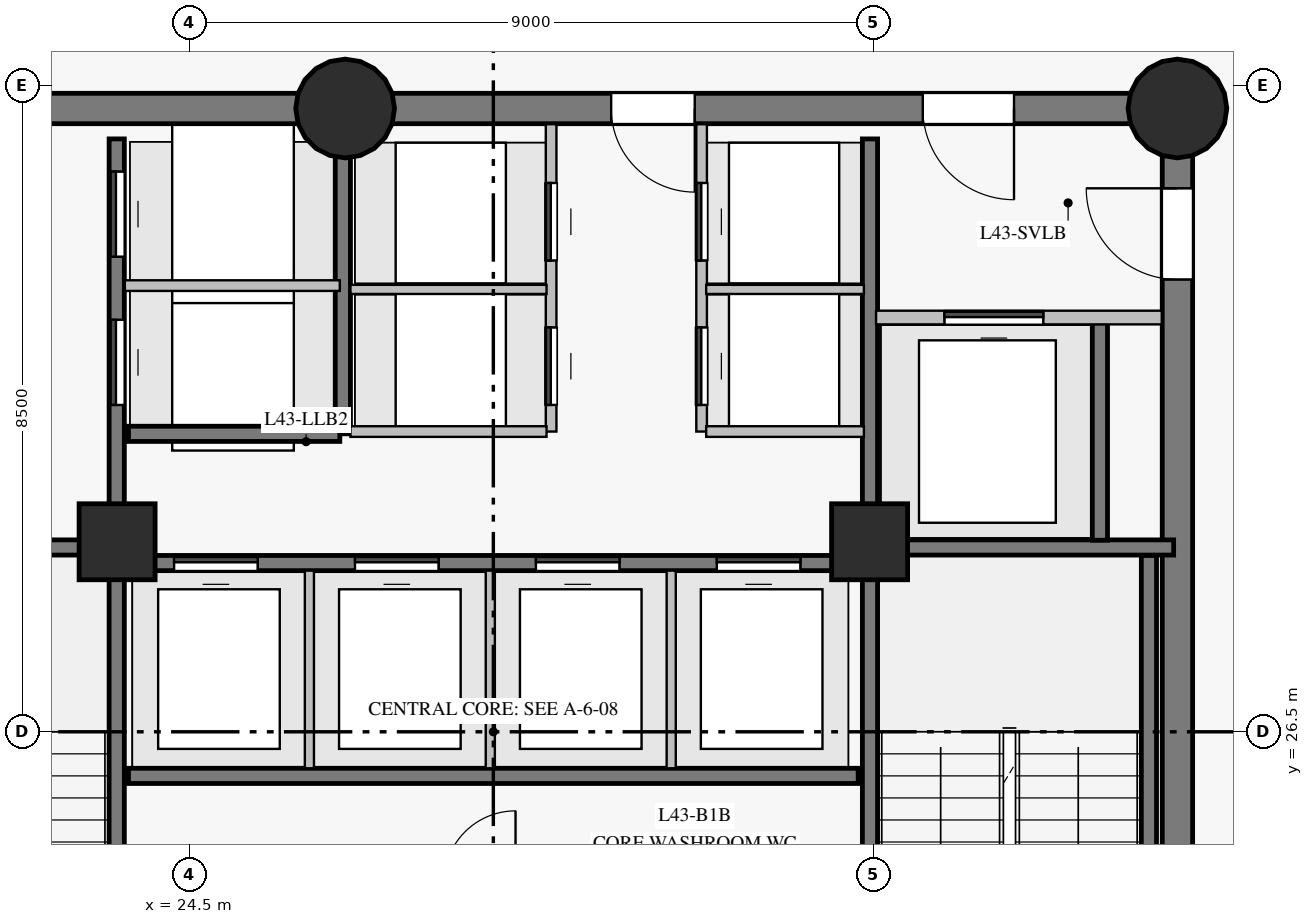
"""IFC4 building model, lengths in metres.
Left out: names, types, materials, properties, quantities, classifications, styles, units other than length and angle.
Written with IfcOpenShell. Run it as: python <this file> out.ifc"""

import sys

from ifc_helpers import new_model, si_unit, direction, frame, frame_2d, origin, origin_with_axes, origin_2d, place, context, subcontext, project, spatial, rectangle, circle, extrude, source, transform, mapped, element, fill, save


model = new_model("IFC4")
c1 = context("Model", 3, precision=1e-05, world=origin(), true_north=direction((0.0, 1.0)))
c2 = subcontext(c1, "Body", "Model", "MODEL_VIEW")
j1 = project(units=[si_unit("LENGTHUNIT", "METRE"), si_unit("PLANEANGLEUNIT", "RADIAN")], contexts=[c1])
p1 = place(None, origin())
s1 = spatial("IfcSite", under=j1, at=p1, CompositionType="ELEMENT")
p2 = place(p1, origin())
s2 = spatial("IfcBuilding", under=s1, at=p2, CompositionType="ELEMENT")
p3 = place(p2, frame((0.0, 0.0, 152.55)))
s3 = spatial("IfcBuildingStorey", under=s2, at=p3, CompositionType="ELEMENT", Elevation=152.55)
p4 = place(p3, frame((37.5, 18.3, 0.0), z_axis=(0.0, 0.0, 1.0), x_axis=(0.0, 1.0, 0.0)))
e1 = element("IfcWall", 1, at=p4, inside=s3, PredefinedType="SHEAR", context=c2, shape_type="SweptSolid", body=[
    extrude(rectangle(XDim=16.4, YDim=0.4, at=frame_2d((8.2, 0.0))), origin(), (0.0, 0.0, 1.0), 3.775),
])
p5 = place(p4, frame((14.15, 0.0, 0.0)))
e2 = element("IfcOpeningElement", 2, at=p5, cuts=e1, PredefinedType="OPENING", context=c2, shape_type="SweptSolid", body=[
    extrude(rectangle(XDim=1.2, YDim=2.15, at=frame_2d((0.6, 1.075))), frame((0.0, 0.21, 0.0), z_axis=(0.0, -1.0, 0.0), x_axis=(1.0, 0.0, 0.0)), (0.0, 0.0, 1.0), 0.42),
])
p6 = place(p3, frame((37.5, 34.7, 0.0), z_axis=(0.0, 0.0, 1.0), x_axis=(-1.0, 0.0, 0.0)))
e3 = element("IfcWall", 3, at=p6, inside=s3, PredefinedType="SHEAR", context=c2, shape_type="SweptSolid", body=[
    extrude(rectangle(XDim=10.95, YDim=0.4, at=frame_2d((5.475, 0.0))), origin(), (0.0, 0.0, 1.0), 3.775),
])
p7 = place(p6, frame((2.15, 0.0, 0.0)))
e4 = element("IfcOpeningElement", 4, at=p7, cuts=e3, PredefinedType="OPENING", context=c2, shape_type="SweptSolid", body=[
    extrude(rectangle(XDim=1.2, YDim=2.15, at=frame_2d((0.6, 1.075))), frame((0.0, 0.21, 0.0), z_axis=(0.0, -1.0, 0.0), x_axis=(1.0, 0.0, 0.0)), (0.0, 0.0, 1.0), 0.42),
])
p8 = place(p6, frame((6.35, 0.0, 0.0)))
e5 = element("IfcOpeningElement", 5, at=p8, cuts=e3, PredefinedType="OPENING", context=c2, shape_type="SweptSolid", body=[
    extrude(rectangle(XDim=1.1, YDim=2.15, at=frame_2d((0.55, 1.075))), frame((0.0, 0.21, 0.0), z_axis=(0.0, -1.0, 0.0), x_axis=(1.0, 0.0, 0.0)), (0.0, 0.0, 1.0), 0.42),
])
p9 = place(p3, frame((26.55, 34.7, 0.0), z_axis=(0.0, 0.0, 1.0), x_axis=(-1.0, 0.0, 0.0)))
e6 = element("IfcWall", 6, at=p9, inside=s3, PredefinedType="SHEAR", context=c2, shape_type="SweptSolid", body=[
    extrude(rectangle(XDim=7.05, YDim=0.4, at=frame_2d((3.525, 0.0))), origin(), (0.0, 0.0, 1.0), 3.775),
])
p10 = place(p9, frame((4.25, 0.0, 0.0)))
e7 = element("IfcOpeningElement", 7, at=p10, cuts=e6, PredefinedType="OPENING", context=c2, shape_type="SweptSolid", body=[
    extrude(rectangle(XDim=1.1, YDim=2.15, at=frame_2d((0.55, 1.075))), frame((0.0, 0.21, 0.0), z_axis=(0.0, -1.0, 0.0), x_axis=(1.0, 0.0, 0.0)), (0.0, 0.0, 1.0), 0.42),
])
m1 = source(origin_with_axes(), c2, "Body", "SweptSolid", [
    extrude(circle(Radius=0.65, at=origin_2d()), origin(), (0.0, 0.0, 1.0), 4.0),
])
for number, where, z_axis, x_axis in (
    (8, (26.55, 34.7, 0.0), (0.0, 0.0, 1.0), (1.0, 0.0, 0.0)),
    (9, (37.5, 34.7, 0.0), (0.0, 0.0, 1.0), (1.0, 0.0, 0.0)),
):
    element("IfcColumn", number, at=place(p3, frame(where, z_axis=z_axis, x_axis=x_axis)), inside=s3, PredefinedType="COLUMN", context=c2, shape_type="MappedRepresentation", body=[
        mapped(m1, transform((0.0, 0.0, 0.0), scale=1.0)),
    ])
m2 = source(origin_with_axes(), c2, "Body", "SweptSolid", [
    extrude(rectangle(XDim=1.0, YDim=1.0, at=origin_2d()), origin(), (0.0, 0.0, 1.0), 4.0),
])
for number, where, z_axis, x_axis in (
    (10, (23.55, 29.0, 0.0), (0.0, 0.0, 1.0), (1.0, 0.0, 0.0)),
    (11, (33.45, 29.0, 0.0), (0.0, 0.0, 1.0), (1.0, 0.0, 0.0)),
):
    element("IfcColumn", number, at=place(p3, frame(where, z_axis=z_axis, x_axis=x_axis)), inside=s3, PredefinedType="COLUMN", context=c2, shape_type="MappedRepresentation", body=[
        mapped(m2, transform((0.0, 0.0, 0.0), scale=1.0)),
    ])
p11 = place(p3, frame((23.545, 18.7, 0.0), z_axis=(0.0, 0.0, 1.0), x_axis=(0.0, 1.0, 0.0)))
e12 = element("IfcWall", 12, at=p11, inside=s3, PredefinedType="SHEAR", context=c2, shape_type="SweptSolid", body=[
    extrude(rectangle(XDim=15.6, YDim=0.2, at=frame_2d((7.8, 0.0))), origin(), (0.0, 0.0, 1.0), 3.775),
])
p12 = place(p11, frame((2.75, 0.0, 0.0)))
e13 = element("IfcOpeningElement", 13, at=p12, cuts=e12, PredefinedType="OPENING", context=c2, shape_type="SweptSolid", body=[
    extrude(rectangle(XDim=1.15, YDim=2.15, at=frame_2d((0.575, 1.075))), frame((0.0, 0.11, 0.0), z_axis=(0.0, -1.0, 0.0), x_axis=(1.0, 0.0, 0.0)), (0.0, 0.0, 1.0), 0.22),
])
p13 = place(p11, frame((0.14, 0.0, 0.0)))
e14 = element("IfcOpeningElement", 14, at=p13, cuts=e12, PredefinedType="OPENING", context=c2, shape_type="SweptSolid", body=[
    extrude(rectangle(XDim=0.88, YDim=2.1, at=frame_2d((0.44, 1.05))), frame((0.0, 0.11, 0.0), z_axis=(0.0, -1.0, 0.0), x_axis=(1.0, 0.0, 0.0)), (0.0, 0.0, 1.0), 0.22),
])
p14 = place(p11, frame((1.36, 0.0, 0.0)))
e15 = element("IfcOpeningElement", 15, at=p14, cuts=e12, PredefinedType="OPENING", context=c2, shape_type="SweptSolid", body=[
    extrude(rectangle(XDim=0.88, YDim=2.1, at=frame_2d((0.44, 1.05))), frame((0.0, 0.11, 0.0), z_axis=(0.0, -1.0, 0.0), x_axis=(1.0, 0.0, 0.0)), (0.0, 0.0, 1.0), 0.22),
])
p15 = place(p11, frame((12.1, 0.0, 0.0)))
e16 = element("IfcOpeningElement", 16, at=p15, cuts=e12, PredefinedType="OPENING", context=c2, shape_type="SweptSolid", body=[
    extrude(rectangle(XDim=1.12, YDim=2.15, at=frame_2d((0.56, 1.075))), frame((0.0, 0.11, 0.0), z_axis=(0.0, -1.0, 0.0), x_axis=(1.0, 0.0, 0.0)), (0.0, 0.0, 1.0), 0.22),
])
p16 = place(p11, frame((14.05, 0.0, 0.0)))
e17 = element("IfcOpeningElement", 17, at=p16, cuts=e12, PredefinedType="OPENING", context=c2, shape_type="SweptSolid", body=[
    extrude(rectangle(XDim=1.12, YDim=2.15, at=frame_2d((0.56, 1.075))), frame((0.0, 0.11, 0.0), z_axis=(0.0, -1.0, 0.0), x_axis=(1.0, 0.0, 0.0)), (0.0, 0.0, 1.0), 0.22),
])
p17 = place(p3, frame((33.455, 18.7, 0.0), z_axis=(0.0, 0.0, 1.0), x_axis=(0.0, 1.0, 0.0)))
e18 = element("IfcWall", 18, at=p17, inside=s3, PredefinedType="SHEAR", context=c2, shape_type="SweptSolid", body=[
    extrude(rectangle(XDim=15.6, YDim=0.2, at=frame_2d((7.8, 0.0))), origin(), (0.0, 0.0, 1.0), 3.775),
])
p18 = place(p17, frame((2.75, 0.0, 0.0)))
e19 = element("IfcOpeningElement", 19, at=p18, cuts=e18, PredefinedType="OPENING", context=c2, shape_type="SweptSolid", body=[
    extrude(rectangle(XDim=1.15, YDim=2.15, at=frame_2d((0.575, 1.075))), frame((0.0, 0.11, 0.0), z_axis=(0.0, -1.0, 0.0), x_axis=(1.0, 0.0, 0.0)), (0.0, 0.0, 1.0), 0.22),
])
p19 = place(p17, frame((0.55, 0.0, 0.0)))
e20 = element("IfcOpeningElement", 20, at=p19, cuts=e18, PredefinedType="OPENING", context=c2, shape_type="SweptSolid", body=[
    extrude(rectangle(XDim=0.94, YDim=2.1, at=frame_2d((0.47, 1.05))), frame((0.0, 0.11, 0.0), z_axis=(0.0, -1.0, 0.0), x_axis=(1.0, 0.0, 0.0)), (0.0, 0.0, 1.0), 0.22),
])
p20 = place(p3, frame((23.7, 25.92, 0.0), z_axis=(0.0, 0.0, 1.0), x_axis=(1.0, 0.0, 0.0)))
e21 = element("IfcWall", 21, at=p20, inside=s3, PredefinedType="SHEAR", context=c2, shape_type="SweptSolid", body=[
    extrude(rectangle(XDim=9.6, YDim=0.2, at=frame_2d((4.8, 0.0))), origin(), (0.0, 0.0, 1.0), 3.775),
])
p21 = place(p3, frame((23.7, 28.72, 0.0), z_axis=(0.0, 0.0, 1.0), x_axis=(1.0, 0.0, 0.0)))
e22 = element("IfcWall", 22, at=p21, inside=s3, PredefinedType="SHEAR", context=c2, shape_type="SweptSolid", body=[
    extrude(rectangle(XDim=9.6, YDim=0.2, at=frame_2d((4.8, 0.0))), origin(), (0.0, 0.0, 1.0), 3.775),
])
p22 = place(p21, frame((0.6, 0.0, 0.0)))
e23 = element("IfcOpeningElement", 23, at=p22, cuts=e22, PredefinedType="OPENING", context=c2, shape_type="SweptSolid", body=[
    extrude(rectangle(XDim=1.1, YDim=2.15, at=frame_2d((0.55, 1.075))), frame((0.0, 0.11, 0.0), z_axis=(0.0, -1.0, 0.0), x_axis=(1.0, 0.0, 0.0)), (0.0, 0.0, 1.0), 0.22),
])
p23 = place(p21, frame((2.98, 0.0, 0.0)))
e24 = element("IfcOpeningElement", 24, at=p23, cuts=e22, PredefinedType="OPENING", context=c2, shape_type="SweptSolid", body=[
    extrude(rectangle(XDim=1.1, YDim=2.15, at=frame_2d((0.55, 1.075))), frame((0.0, 0.11, 0.0), z_axis=(0.0, -1.0, 0.0), x_axis=(1.0, 0.0, 0.0)), (0.0, 0.0, 1.0), 0.22),
])
p24 = place(p21, frame((5.36, 0.0, 0.0)))
e25 = element("IfcOpeningElement", 25, at=p24, cuts=e22, PredefinedType="OPENING", context=c2, shape_type="SweptSolid", body=[
    extrude(rectangle(XDim=1.1, YDim=2.15, at=frame_2d((0.55, 1.075))), frame((0.0, 0.11, 0.0), z_axis=(0.0, -1.0, 0.0), x_axis=(1.0, 0.0, 0.0)), (0.0, 0.0, 1.0), 0.22),
])
p25 = place(p21, frame((7.74, 0.0, 0.0)))
e26 = element("IfcOpeningElement", 26, at=p25, cuts=e22, PredefinedType="OPENING", context=c2, shape_type="SweptSolid", body=[
    extrude(rectangle(XDim=1.1, YDim=2.15, at=frame_2d((0.55, 1.075))), frame((0.0, 0.11, 0.0), z_axis=(0.0, -1.0, 0.0), x_axis=(1.0, 0.0, 0.0)), (0.0, 0.0, 1.0), 0.22),
])
p26 = place(p3, frame((37.125, 21.32, 0.0), z_axis=(0.0, 0.0, 1.0), x_axis=(0.0, 1.0, 0.0)))
e27 = element("IfcWall", 27, at=p26, inside=s3, PredefinedType="SHEAR", context=c2, shape_type="SweptSolid", body=[
    extrude(rectangle(XDim=7.5, YDim=0.2, at=frame_2d((3.75, 0.0))), origin(), (0.0, 0.0, 1.0), 3.775),
])
for number, where, z_axis, x_axis in (
    (28, (33.455, 28.925, 0.0), (0.0, 0.0, 1.0), (1.0, 0.0, 0.0)),
    (29, (19.55, 28.925, 0.0), (0.0, 0.0, 1.0), (1.0, 0.0, 0.0)),
):
    element("IfcWall", number, at=place(p3, frame(where, z_axis=z_axis, x_axis=x_axis)), inside=s3, PredefinedType="SHEAR", context=c2, shape_type="SweptSolid", body=[
        extrude(rectangle(XDim=3.995, YDim=0.2, at=frame_2d((1.998, 0.0))), origin(), (0.0, 0.0, 1.0), 3.775),
    ])
p27 = place(p3, frame((26.52, 30.42, 0.0), z_axis=(0.0, 0.0, 1.0), x_axis=(0.0, 1.0, 0.0)))
e30 = element("IfcWall", 30, at=p27, inside=s3, PredefinedType="SHEAR", context=c2, shape_type="SweptSolid", body=[
    extrude(rectangle(XDim=3.86, YDim=0.2, at=frame_2d((1.93, 0.0))), origin(), (0.0, 0.0, 1.0), 3.775),
])
p28 = place(p3, frame((36.48, 29.02, 0.0), z_axis=(0.0, 0.0, 1.0), x_axis=(0.0, 1.0, 0.0)))
e31 = element("IfcWall", 31, at=p28, inside=s3, PredefinedType="SHEAR", context=c2, shape_type="SweptSolid", body=[
    extrude(rectangle(XDim=2.86, YDim=0.2, at=frame_2d((1.43, 0.0))), origin(), (0.0, 0.0, 1.0), 3.775),
])
p29 = place(p3, frame((23.7, 30.42, 0.0), z_axis=(0.0, 0.0, 1.0), x_axis=(1.0, 0.0, 0.0)))
e32 = element("IfcWall", 32, at=p29, inside=s3, PredefinedType="SHEAR", context=c2, shape_type="SweptSolid", body=[
    extrude(rectangle(XDim=2.78, YDim=0.2, at=frame_2d((1.39, 0.0))), origin(), (0.0, 0.0, 1.0), 3.775),
])
p30 = place(p3, frame((29.26, 30.45, 0.0), z_axis=(0.0, 0.0, 1.0), x_axis=(0.0, 1.0, 0.0)))
e33 = element("IfcWall", 33, at=p30, inside=s3, PredefinedType="PARTITIONING", context=c2, shape_type="SweptSolid", body=[
    extrude(rectangle(XDim=4.043, YDim=0.14, at=frame_2d((2.021, 0.0))), origin(), (0.0, 0.0, 1.0), 3.775),
])
p31 = place(p30, frame((0.35, 0.0, 0.0)))
e34 = element("IfcOpeningElement", 34, at=p31, cuts=e33, PredefinedType="OPENING", context=c2, shape_type="SweptSolid", body=[
    extrude(rectangle(XDim=1.02, YDim=2.15, at=frame_2d((0.51, 1.075))), frame((0.0, 0.08, 0.0), z_axis=(0.0, -1.0, 0.0), x_axis=(1.0, 0.0, 0.0)), (0.0, 0.0, 1.0), 0.16),
])
p32 = place(p30, frame((2.25, 0.0, 0.0)))
e35 = element("IfcOpeningElement", 35, at=p32, cuts=e33, PredefinedType="OPENING", context=c2, shape_type="SweptSolid", body=[
    extrude(rectangle(XDim=1.02, YDim=2.15, at=frame_2d((0.51, 1.075))), frame((0.0, 0.08, 0.0), z_axis=(0.0, -1.0, 0.0), x_axis=(1.0, 0.0, 0.0)), (0.0, 0.0, 1.0), 0.16),
])
p33 = place(p3, frame((31.24, 30.45, 0.0), z_axis=(0.0, 0.0, 1.0), x_axis=(0.0, 1.0, 0.0)))
e36 = element("IfcWall", 36, at=p33, inside=s3, PredefinedType="PARTITIONING", context=c2, shape_type="SweptSolid", body=[
    extrude(rectangle(XDim=4.043, YDim=0.14, at=frame_2d((2.021, 0.0))), origin(), (0.0, 0.0, 1.0), 3.775),
])
p34 = place(p33, frame((0.35, 0.0, 0.0)))
e37 = element("IfcOpeningElement", 37, at=p34, cuts=e36, PredefinedType="OPENING", context=c2, shape_type="SweptSolid", body=[
    extrude(rectangle(XDim=1.02, YDim=2.15, at=frame_2d((0.51, 1.075))), frame((0.0, 0.08, 0.0), z_axis=(0.0, -1.0, 0.0), x_axis=(1.0, 0.0, 0.0)), (0.0, 0.0, 1.0), 0.16),
])
p35 = place(p33, frame((2.25, 0.0, 0.0)))
e38 = element("IfcOpeningElement", 38, at=p35, cuts=e36, PredefinedType="OPENING", context=c2, shape_type="SweptSolid", body=[
    extrude(rectangle(XDim=1.02, YDim=2.15, at=frame_2d((0.51, 1.075))), frame((0.0, 0.08, 0.0), z_axis=(0.0, -1.0, 0.0), x_axis=(1.0, 0.0, 0.0)), (0.0, 0.0, 1.0), 0.16),
])
p36 = place(p3, frame((33.535, 31.95, 0.0), z_axis=(0.0, 0.0, 1.0), x_axis=(1.0, 0.0, 0.0)))
e39 = element("IfcWall", 39, at=p36, inside=s3, PredefinedType="PARTITIONING", context=c2, shape_type="SweptSolid", body=[
    extrude(rectangle(XDim=3.759, YDim=0.18, at=frame_2d((1.879, 0.0))), origin(), (0.0, 0.0, 1.0), 3.775),
])
p37 = place(p36, frame((0.9, 0.0, 0.0)))
e40 = element("IfcOpeningElement", 40, at=p37, cuts=e39, PredefinedType="OPENING", context=c2, shape_type="SweptSolid", body=[
    extrude(rectangle(XDim=1.3, YDim=2.2, at=frame_2d((0.65, 1.1))), frame((0.0, 0.1, 0.0), z_axis=(0.0, -1.0, 0.0), x_axis=(1.0, 0.0, 0.0)), (0.0, 0.0, 1.0), 0.2),
])
p38 = place(p3, frame((23.652, 32.37, 0.0), z_axis=(0.0, 0.0, 1.0), x_axis=(1.0, 0.0, 0.0)))
e41 = element("IfcWall", 41, at=p38, inside=s3, PredefinedType="PARTITIONING", context=c2, shape_type="SweptSolid", body=[
    extrude(rectangle(XDim=2.828, YDim=0.14, at=frame_2d((1.414, 0.0))), origin(), (0.0, 0.0, 1.0), 3.775),
])
for number, where, z_axis, x_axis in (
    (42, (26.08, 26.02, 0.0), (0.0, 0.0, 1.0), (0.0, 1.0, 0.0)),
    (43, (28.46, 26.02, 0.0), (0.0, 0.0, 1.0), (0.0, 1.0, 0.0)),
    (44, (30.84, 26.02, 0.0), (0.0, 0.0, 1.0), (0.0, 1.0, 0.0)),
):
    element("IfcWall", number, at=place(p3, frame(where, z_axis=z_axis, x_axis=x_axis)), inside=s3, PredefinedType="PARTITIONING", context=c2, shape_type="SweptSolid", body=[
        extrude(rectangle(XDim=2.6, YDim=0.12, at=frame_2d((1.3, 0.0))), origin(), (0.0, 0.0, 1.0), 3.775),
    ])
p39 = place(p3, frame((26.62, 30.45, 0.0), z_axis=(0.0, 0.0, 1.0), x_axis=(1.0, 0.0, 0.0)))
e45 = element("IfcWall", 45, at=p39, inside=s3, PredefinedType="PARTITIONING", context=c2, shape_type="SweptSolid", body=[
    extrude(rectangle(XDim=2.58, YDim=0.14, at=frame_2d((1.29, 0.0))), origin(), (0.0, 0.0, 1.0), 3.775),
])
p40 = place(p3, frame((26.62, 32.32, 0.0), z_axis=(0.0, 0.0, 1.0), x_axis=(1.0, 0.0, 0.0)))
e46 = element("IfcWall", 46, at=p40, inside=s3, PredefinedType="PARTITIONING", context=c2, shape_type="SweptSolid", body=[
    extrude(rectangle(XDim=2.58, YDim=0.12, at=frame_2d((1.29, 0.0))), origin(), (0.0, 0.0, 1.0), 3.775),
])
p41 = place(p3, frame((31.3, 30.45, 0.0), z_axis=(0.0, 0.0, 1.0), x_axis=(1.0, 0.0, 0.0)))
e47 = element("IfcWall", 47, at=p41, inside=s3, PredefinedType="PARTITIONING", context=c2, shape_type="SweptSolid", body=[
    extrude(rectangle(XDim=2.075, YDim=0.14, at=frame_2d((1.038, 0.0))), origin(), (0.0, 0.0, 1.0), 3.775),
])
p42 = place(p3, frame((31.3, 32.32, 0.0), z_axis=(0.0, 0.0, 1.0), x_axis=(1.0, 0.0, 0.0)))
e48 = element("IfcWall", 48, at=p42, inside=s3, PredefinedType="PARTITIONING", context=c2, shape_type="SweptSolid", body=[
    extrude(rectangle(XDim=2.075, YDim=0.12, at=frame_2d((1.038, 0.0))), origin(), (0.0, 0.0, 1.0), 3.775),
])
m3 = source(origin_with_axes(), c2, "Body", "SweptSolid", [
    extrude(rectangle(XDim=1.2, YDim=2.15, at=frame_2d((0.6, 1.075))), frame((0.0, 0.025, 0.0), z_axis=(0.0, -1.0, 0.0), x_axis=(1.0, 0.0, 0.0)), (0.0, 0.0, 1.0), 0.05),
])
p43 = place(p5, origin())
e49 = element("IfcDoor", 49, at=p43, inside=s3, OperationType="SINGLE_SWING_RIGHT", PredefinedType="DOOR", context=c2, shape_type="MappedRepresentation", body=[
    mapped(m3, transform((0.0, 0.0, 0.0), scale=1.0)),
])
fill(e2, e49)
p44 = place(p7, origin())
e50 = element("IfcDoor", 50, at=p44, inside=s3, OperationType="SINGLE_SWING_LEFT", PredefinedType="DOOR", context=c2, shape_type="MappedRepresentation", body=[
    mapped(m3, transform((0.0, 0.0, 0.0), scale=1.0)),
])
fill(e4, e50)
m4 = source(origin_with_axes(), c2, "Body", "SweptSolid", [
    extrude(rectangle(XDim=1.3, YDim=2.2, at=frame_2d((0.65, 1.1))), frame((0.0, 0.025, 0.0), z_axis=(0.0, -1.0, 0.0), x_axis=(1.0, 0.0, 0.0)), (0.0, 0.0, 1.0), 0.05),
])
p45 = place(p37, origin())
e51 = element("IfcDoor", 51, at=p45, inside=s3, OperationType="SLIDING_TO_LEFT", PredefinedType="DOOR", context=c2, shape_type="MappedRepresentation", body=[
    mapped(m4, transform((0.0, 0.0, 0.0), scale=1.0)),
])
fill(e40, e51)
m5 = source(origin_with_axes(), c2, "Body", "SweptSolid", [
    extrude(rectangle(XDim=1.1, YDim=2.15, at=frame_2d((0.55, 1.075))), frame((0.0, 0.025, 0.0), z_axis=(0.0, -1.0, 0.0), x_axis=(1.0, 0.0, 0.0)), (0.0, 0.0, 1.0), 0.05),
])
p46 = place(p22, origin())
e52 = element("IfcDoor", 52, at=p46, inside=s3, OperationType="SLIDING_TO_LEFT", PredefinedType="DOOR", context=c2, shape_type="MappedRepresentation", body=[
    mapped(m5, transform((0.0, 0.0, 0.0), scale=1.0)),
])
fill(e23, e52)
p47 = place(p23, origin())
e53 = element("IfcDoor", 53, at=p47, inside=s3, OperationType="SLIDING_TO_RIGHT", PredefinedType="DOOR", context=c2, shape_type="MappedRepresentation", body=[
    mapped(m5, transform((0.0, 0.0, 0.0), scale=1.0)),
])
fill(e24, e53)
p48 = place(p24, origin())
e54 = element("IfcDoor", 54, at=p48, inside=s3, OperationType="SLIDING_TO_LEFT", PredefinedType="DOOR", context=c2, shape_type="MappedRepresentation", body=[
    mapped(m5, transform((0.0, 0.0, 0.0), scale=1.0)),
])
fill(e25, e54)
p49 = place(p25, origin())
e55 = element("IfcDoor", 55, at=p49, inside=s3, OperationType="SLIDING_TO_RIGHT", PredefinedType="DOOR", context=c2, shape_type="MappedRepresentation", body=[
    mapped(m5, transform((0.0, 0.0, 0.0), scale=1.0)),
])
fill(e26, e55)
p50 = place(p8, origin())
e56 = element("IfcDoor", 56, at=p50, inside=s3, OperationType="SINGLE_SWING_LEFT", PredefinedType="DOOR", context=c2, shape_type="MappedRepresentation", body=[
    mapped(m5, transform((0.0, 0.0, 0.0), scale=1.0)),
])
fill(e5, e56)
m6 = source(origin_with_axes(), c2, "Body", "SweptSolid", [
    extrude(rectangle(XDim=1.12, YDim=2.15, at=frame_2d((0.56, 1.075))), frame((0.0, 0.025, 0.0), z_axis=(0.0, -1.0, 0.0), x_axis=(1.0, 0.0, 0.0)), (0.0, 0.0, 1.0), 0.05),
])
p51 = place(p15, origin())
e57 = element("IfcDoor", 57, at=p51, inside=s3, OperationType="SLIDING_TO_LEFT", PredefinedType="DOOR", context=c2, shape_type="MappedRepresentation", body=[
    mapped(m6, transform((0.0, 0.0, 0.0), scale=1.0)),
])
fill(e16, e57)
p52 = place(p16, origin())
e58 = element("IfcDoor", 58, at=p52, inside=s3, OperationType="SLIDING_TO_RIGHT", PredefinedType="DOOR", context=c2, shape_type="MappedRepresentation", body=[
    mapped(m6, transform((0.0, 0.0, 0.0), scale=1.0)),
])
fill(e17, e58)
m7 = source(origin_with_axes(), c2, "Body", "SweptSolid", [
    extrude(rectangle(XDim=1.02, YDim=2.15, at=frame_2d((0.51, 1.075))), frame((0.0, 0.025, 0.0), z_axis=(0.0, -1.0, 0.0), x_axis=(1.0, 0.0, 0.0)), (0.0, 0.0, 1.0), 0.05),
])
p53 = place(p31, origin())
e59 = element("IfcDoor", 59, at=p53, inside=s3, OperationType="SLIDING_TO_LEFT", PredefinedType="DOOR", context=c2, shape_type="MappedRepresentation", body=[
    mapped(m7, transform((0.0, 0.0, 0.0), scale=1.0)),
])
fill(e34, e59)
p54 = place(p32, origin())
e60 = element("IfcDoor", 60, at=p54, inside=s3, OperationType="SLIDING_TO_LEFT", PredefinedType="DOOR", context=c2, shape_type="MappedRepresentation", body=[
    mapped(m7, transform((0.0, 0.0, 0.0), scale=1.0)),
])
fill(e35, e60)
p55 = place(p34, origin())
e61 = element("IfcDoor", 61, at=p55, inside=s3, OperationType="SLIDING_TO_LEFT", PredefinedType="DOOR", context=c2, shape_type="MappedRepresentation", body=[
    mapped(m7, transform((0.0, 0.0, 0.0), scale=1.0)),
])
fill(e37, e61)
p56 = place(p35, origin())
e62 = element("IfcDoor", 62, at=p56, inside=s3, OperationType="SLIDING_TO_LEFT", PredefinedType="DOOR", context=c2, shape_type="MappedRepresentation", body=[
    mapped(m7, transform((0.0, 0.0, 0.0), scale=1.0)),
])
fill(e38, e62)
save(model, sys.argv[1])
